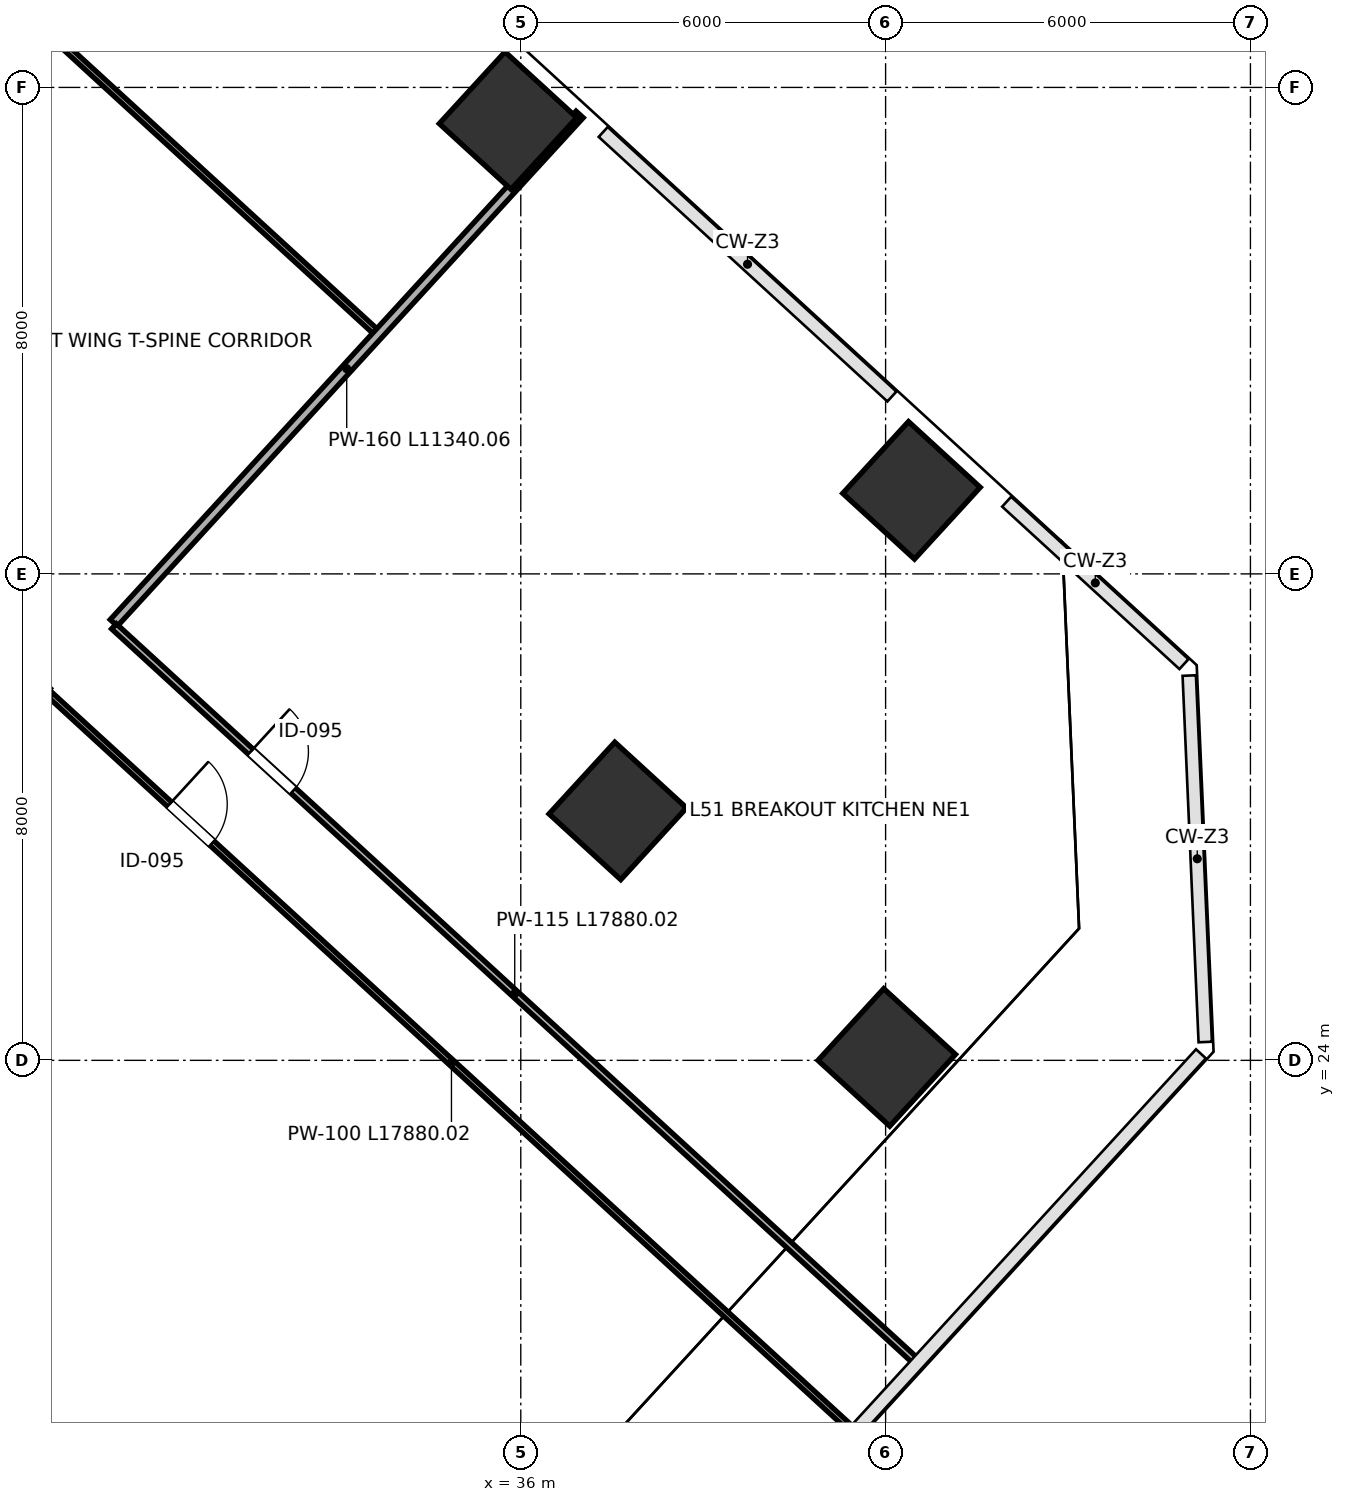
"""IFC4 building model, lengths in metres.
Left out: names, types, materials, properties, quantities, classifications, styles, units other than length and angle.
Written with IfcOpenShell. Run it as: python <this file> out.ifc"""

import sys

from ifc_helpers import new_model, si_unit, direction, frame, frame_2d, origin, origin_2d, place, context, subcontext, project, spatial, rectangle, extrude, source, transform, mapped, element, fill, save


model = new_model("IFC4")
c1 = context("Model", 3, precision=1e-05, world=origin(), true_north=direction((0.0, 1.0)))
c2 = subcontext(c1, "Body", "Model", "MODEL_VIEW")
j1 = project(units=[si_unit("LENGTHUNIT", "METRE"), si_unit("PLANEANGLEUNIT", "RADIAN")], contexts=[c1])
p1 = place(None, origin())
s1 = spatial("IfcSite", under=j1, at=p1, CompositionType="ELEMENT")
p2 = place(p1, origin())
s2 = spatial("IfcBuilding", under=s1, at=p2, CompositionType="ELEMENT")
p3 = place(p2, frame((0.0, 0.0, 229.0)))
s3 = spatial("IfcBuildingStorey", under=s2, at=p3, CompositionType="ELEMENT", Elevation=229.0)
m1 = source(origin(), c2, "Body", "SweptSolid", [
    extrude(rectangle(XDim=1.6, YDim=1.6, at=origin_2d()), origin(), (0.0, 0.0, 1.0), 4.198),
])
p4 = place(p3, frame((35.79, 39.454, 0.001), z_axis=(0.0, 0.0, 1.0), x_axis=(-0.73727733681, 0.675590207616, 0.0)))
e1 = element("IfcColumn", 1, at=p4, inside=s3, PredefinedType="COLUMN", context=c2, shape_type="MappedRepresentation", body=[
    mapped(m1, transform((0.0, 0.0, 0.0), scale=1.0)),
])
m2 = source(origin(), c2, "Body", "SweptSolid", [
    extrude(rectangle(XDim=1.6, YDim=1.6, at=origin_2d()), origin(), (0.0, 0.0, 1.0), 4.198),
])
p5 = place(p3, frame((37.595, 28.102, 0.001), z_axis=(0.0, 0.0, 1.0), x_axis=(-0.73727733681, 0.675590207616, 0.0)))
e2 = element("IfcColumn", 2, at=p5, inside=s3, PredefinedType="COLUMN", context=c2, shape_type="MappedRepresentation", body=[
    mapped(m2, transform((0.0, 0.0, 0.0), scale=1.0)),
])
for number, where, z_axis, x_axis in (
    (3, (42.426, 33.374, 0.001), (0.0, 0.0, 1.0), (-0.737, 0.676, 0.0)),
    (4, (42.019, 24.049, 0.001), (0.0, 0.0, 1.0), (-0.737, 0.676, 0.0)),
):
    element("IfcColumn", number, at=place(p3, frame(where, z_axis=z_axis, x_axis=x_axis)), inside=s3, PredefinedType="COLUMN", context=c2, shape_type="MappedRepresentation", body=[
        mapped(m1, transform((0.0, 0.0, 0.0), scale=1.0)),
    ])
p6 = place(p3, frame((17.504, 50.744, 0.0), z_axis=(0.0, 0.0, 1.0), x_axis=(0.737277850523, -0.675589646996, 0.0)))
e5 = element("IfcWall", 5, at=p6, inside=s3, PredefinedType="PARTITIONING", context=c2, shape_type="SweptSolid", body=[
    extrude(rectangle(XDim=21.87, YDim=0.1, at=frame_2d((10.935, 0.0))), origin(), (0.0, 0.0, 1.0), 3.96),
])
p7 = place(p6, frame((5.4, 0.0, 0.0)))
e6 = element("IfcOpeningElement", 6, at=p7, cuts=e5, PredefinedType="OPENING", context=c2, shape_type="SweptSolid", body=[
    extrude(rectangle(XDim=0.95, YDim=2.15, at=frame_2d((0.475, 1.075))), frame((0.0, 0.06, 0.0), z_axis=(0.0, -1.0, 0.0), x_axis=(1.0, 0.0, 0.0)), (0.0, 0.0, 1.0), 0.12),
])
p8 = place(p3, frame((29.307, 31.194, 0.0), z_axis=(0.0, 0.0, 1.0), x_axis=(0.67558228032, 0.73728460076, 0.0)))
e7 = element("IfcWall", 7, at=p8, inside=s3, PredefinedType="PARTITIONING", context=c2, shape_type="SweptSolid", body=[
    extrude(rectangle(XDim=11.34, YDim=0.16, at=frame_2d((5.67, 0.0))), origin(), (0.0, 0.0, 1.0), 3.195),
])
p9 = place(p3, frame((29.309, 31.138, 0.0), z_axis=(0.0, 0.0, 1.0), x_axis=(0.737278819957, -0.675588589041, 0.0)))
e8 = element("IfcWall", 8, at=p9, inside=s3, PredefinedType="PARTITIONING", context=c2, shape_type="SweptSolid", body=[
    extrude(rectangle(XDim=17.88, YDim=0.115, at=frame_2d((8.94, 0.0))), origin(), (0.0, 0.0, 1.0), 3.252),
])
p10 = place(p9, frame((3.05, 0.0, 0.0)))
e9 = element("IfcOpeningElement", 9, at=p10, cuts=e8, PredefinedType="OPENING", context=c2, shape_type="SweptSolid", body=[
    extrude(rectangle(XDim=0.95, YDim=2.15, at=frame_2d((0.475, 1.075))), frame((0.0, 0.067, 0.0), z_axis=(0.0, -1.0, 0.0), x_axis=(1.0, 0.0, 0.0)), (0.0, 0.0, 1.0), 0.135),
])
p11 = place(p3, frame((28.269, 30.002, 0.0), z_axis=(0.0, 0.0, 1.0), x_axis=(0.737272587758, -0.67559539026, 0.0)))
e10 = element("IfcWall", 10, at=p11, inside=s3, PredefinedType="PARTITIONING", context=c2, shape_type="SweptSolid", body=[
    extrude(rectangle(XDim=17.88, YDim=0.1, at=frame_2d((8.94, 0.0))), origin(), (0.0, 0.0, 1.0), 3.252),
])
p12 = place(p11, frame((2.65, 0.0, 0.0)))
e11 = element("IfcOpeningElement", 11, at=p12, cuts=e10, PredefinedType="OPENING", context=c2, shape_type="SweptSolid", body=[
    extrude(rectangle(XDim=0.95, YDim=2.15, at=frame_2d((0.475, 1.075))), frame((0.0, 0.06, 0.0), z_axis=(0.0, -1.0, 0.0), x_axis=(1.0, 0.0, 0.0)), (0.0, 0.0, 1.0), 0.12),
])
m3 = source(origin(), c2, "Body", "SweptSolid", [
    extrude(rectangle(XDim=0.95, YDim=2.15, at=frame_2d((0.475, 1.075))), frame((0.0, 0.025, 0.0), z_axis=(0.0, -1.0, 0.0), x_axis=(1.0, 0.0, 0.0)), (0.0, 0.0, 1.0), 0.05),
])
p13 = place(p10, origin())
e12 = element("IfcDoor", 12, at=p13, inside=s3, OperationType="SINGLE_SWING_LEFT", PredefinedType="DOOR", context=c2, shape_type="MappedRepresentation", body=[
    mapped(m3, transform((0.0, 0.0, 0.0), scale=1.0)),
])
fill(e9, e12)
p14 = place(p12, origin())
e13 = element("IfcDoor", 13, at=p14, inside=s3, OperationType="SINGLE_SWING_LEFT", PredefinedType="DOOR", context=c2, shape_type="MappedRepresentation", body=[
    mapped(m3, transform((0.0, 0.0, 0.0), scale=1.0)),
])
fill(e11, e13)
save(model, sys.argv[1])
